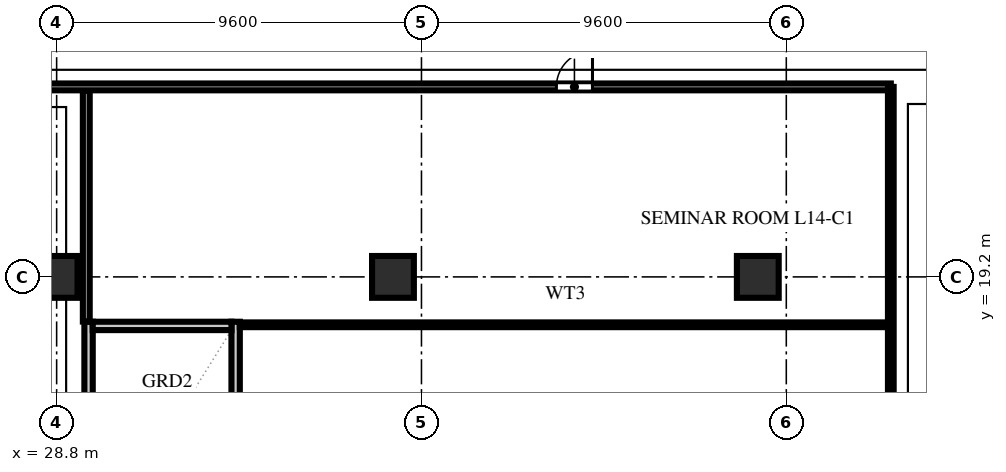
"""IFC4 building model, lengths in metres.
Left out: names, types, materials, properties, quantities, classifications, styles, units other than length and angle.
Written with IfcOpenShell. Run it as: python <this file> out.ifc"""

import sys

from ifc_helpers import new_model, si_unit, direction, frame, frame_2d, origin, origin_2d, place, context, subcontext, project, spatial, rectangle, extrude, element, fill, save


model = new_model("IFC4")
c1 = context("Model", 3, precision=1e-05, world=origin(), true_north=direction((0.0, 1.0)))
c2 = subcontext(c1, "Body", "Model", "MODEL_VIEW")
j1 = project(units=[si_unit("LENGTHUNIT", "METRE"), si_unit("PLANEANGLEUNIT", "RADIAN")], contexts=[c1])
p1 = place(None, origin())
s1 = spatial("IfcSite", under=j1, at=p1, CompositionType="ELEMENT")
p2 = place(p1, origin())
s2 = spatial("IfcBuilding", under=s1, at=p2, CompositionType="ELEMENT")
p3 = place(p2, frame((0.0, 0.0, 58.4)))
s3 = spatial("IfcBuildingStorey", under=s2, at=p3, CompositionType="ELEMENT", Elevation=58.4)
for number, where, z_axis, x_axis in (
    (1, (28.8, 19.2, 0.0), (0.0, 0.0, 1.0), (1.0, 0.0, 0.0)),
    (2, (37.65, 19.2, 0.0), (0.0, 0.0, 1.0), (1.0, 0.0, 0.0)),
    (3, (47.25, 19.2, 0.0), (0.0, 0.0, 1.0), (1.0, 0.0, 0.0)),
):
    element("IfcColumn", number, at=place(p3, frame(where, z_axis=z_axis, x_axis=x_axis)), inside=s3, PredefinedType="COLUMN", context=c2, shape_type="SweptSolid", body=[
        extrude(rectangle(XDim=1.1, YDim=1.1, at=origin_2d()), origin(), (0.0, 0.0, 1.0), 3.8),
    ])
for number, where, z_axis, x_axis in (
    (4, (29.64, 9.88, 0.0), (0.0, 0.0, 1.0), (0.0, 1.0, 0.0)),
    (5, (33.51, 9.88, 0.0), (0.0, 0.0, 1.0), (0.0, 1.0, 0.0)),
):
    element("IfcWall", number, at=place(p3, frame(where, z_axis=z_axis, x_axis=x_axis)), inside=s3, PredefinedType="SOLIDWALL", context=c2, shape_type="SweptSolid", body=[
        extrude(rectangle(XDim=8.14, YDim=0.22, at=frame_2d((4.07, 0.0))), origin(), (0.0, 0.0, 1.0), 3.54),
    ])
p4 = place(p3, frame((29.75, 17.91, 0.0), z_axis=(0.0, 0.0, 1.0), x_axis=(1.0, 0.0, 0.0)))
e6 = element("IfcWall", 6, at=p4, inside=s3, PredefinedType="SOLIDWALL", context=c2, shape_type="SweptSolid", body=[
    extrude(rectangle(XDim=3.65, YDim=0.22, at=frame_2d((1.825, 0.0))), origin(), (0.0, 0.0, 1.0), 3.54),
])
p5 = place(p3, frame((29.58, 18.025, 0.0), z_axis=(0.0, 0.0, 1.0), x_axis=(0.0, 1.0, 0.0)))
e7 = element("IfcWall", 7, at=p5, inside=s3, PredefinedType="PARTITIONING", context=c2, shape_type="SweptSolid", body=[
    extrude(rectangle(XDim=6.08, YDim=0.18, at=frame_2d((3.04, 0.0))), origin(), (0.0, 0.0, 1.0), 3.54),
])
p6 = place(p3, frame((19.28, 24.2, 0.0), z_axis=(0.0, 0.0, 1.0), x_axis=(1.0, 0.0, 0.0)))
e8 = element("IfcWall", 8, at=p6, inside=s3, PredefinedType="PARTITIONING", context=c2, shape_type="SweptSolid", body=[
    extrude(rectangle(XDim=31.47, YDim=0.18, at=frame_2d((15.735, 0.0))), origin(), (0.0, 0.0, 1.0), 3.54),
])
p7 = place(p6, frame((22.67, 0.0, 0.0)))
e9 = element("IfcOpeningElement", 9, at=p7, cuts=e8, PredefinedType="OPENING", context=c2, shape_type="SweptSolid", body=[
    extrude(rectangle(XDim=0.95, YDim=2.15, at=frame_2d((0.475, 1.075))), frame((0.0, 0.102, 0.0), z_axis=(0.0, -1.0, 0.0), x_axis=(1.0, 0.0, 0.0)), (0.0, 0.0, 1.0), 0.204),
])
p8 = place(p3, frame((33.62, 17.94, 0.0), z_axis=(0.0, 0.0, 1.0), x_axis=(1.0, 0.0, 0.0)))
e10 = element("IfcWall", 10, at=p8, inside=s3, PredefinedType="PARTITIONING", context=c2, shape_type="SweptSolid", body=[
    extrude(rectangle(XDim=17.13, YDim=0.125, at=frame_2d((8.565, 0.0))), origin(), (0.0, 0.0, 1.0), 3.54),
])
p9 = place(p3, frame((50.75, 8.25, 0.0), z_axis=(0.0, 0.0, 1.0), x_axis=(0.0, 1.0, 0.0)))
e11 = element("IfcWall", 11, at=p9, inside=s3, PredefinedType="PARTITIONING", context=c2, shape_type="SweptSolid", body=[
    extrude(rectangle(XDim=15.95, YDim=0.15, at=frame_2d((7.975, 0.0))), origin(), (0.0, 0.0, 1.0), 3.54),
])
p10 = place(p7, origin())
e12 = element("IfcDoor", 12, at=p10, inside=s3, OperationType="SINGLE_SWING_RIGHT", PredefinedType="DOOR", context=c2, shape_type="SweptSolid", body=[
    extrude(rectangle(XDim=0.95, YDim=2.15, at=frame_2d((0.475, 1.075))), frame((0.0, 0.025, 0.0), z_axis=(0.0, -1.0, 0.0), x_axis=(1.0, 0.0, 0.0)), (0.0, 0.0, 1.0), 0.05),
])
fill(e9, e12)
save(model, sys.argv[1])
